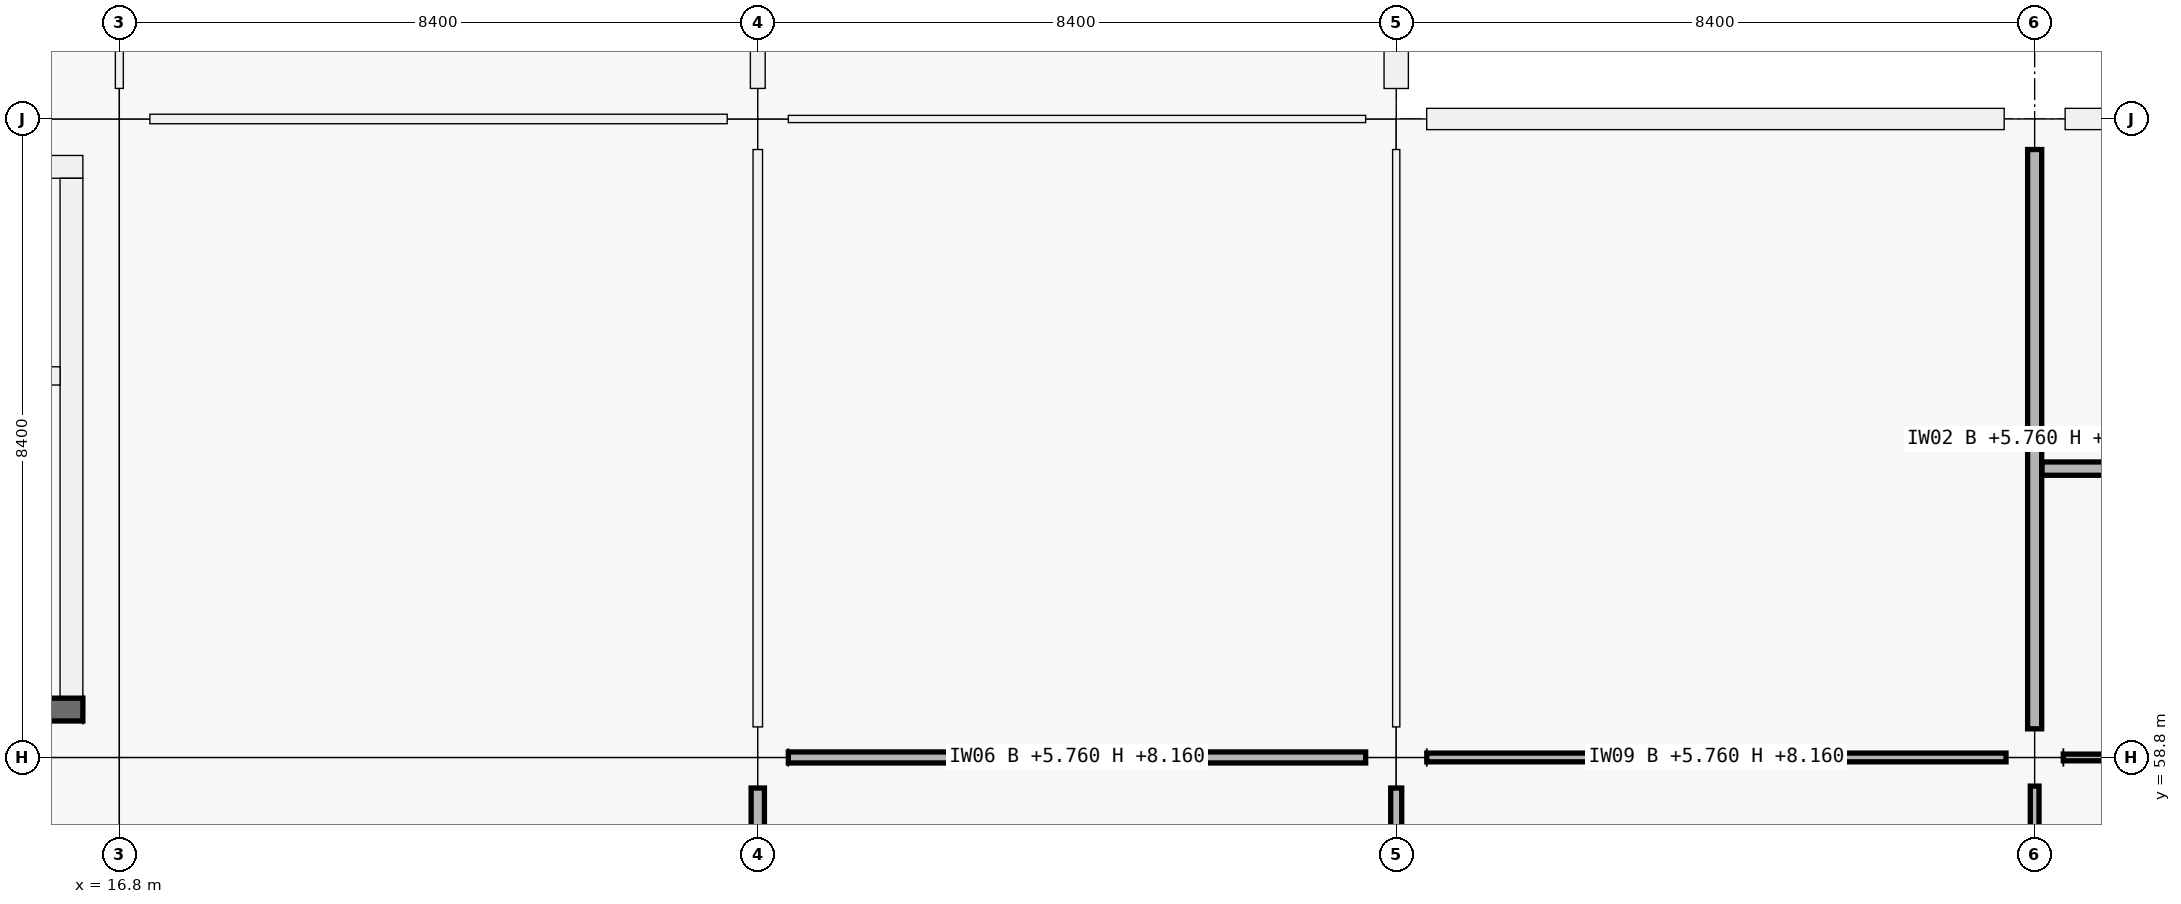
"""IFC4 building model, lengths in metres.
Left out: names, types, materials, properties, quantities, classifications, styles, units other than length and angle.
Written with IfcOpenShell. Run it as: python <this file> out.ifc"""

import sys

from ifc_helpers import new_model, si_unit, direction, frame, frame_2d, origin, origin_2d, place, context, subcontext, project, spatial, rectangle, extrude, element, fill, save


model = new_model("IFC4")
c1 = context("Model", 3, precision=1e-05, world=origin(), true_north=direction((0.0, 1.0)))
c2 = subcontext(c1, "Body", "Model", "MODEL_VIEW")
j1 = project(units=[si_unit("LENGTHUNIT", "METRE"), si_unit("PLANEANGLEUNIT", "RADIAN")], contexts=[c1])
p1 = place(None, origin())
s1 = spatial("IfcSite", under=j1, at=p1, CompositionType="ELEMENT")
p2 = place(p1, origin())
s2 = spatial("IfcBuilding", under=s1, at=p2, CompositionType="ELEMENT")
p3 = place(p2, frame((0.0, 0.0, 5.76)))
s3 = spatial("IfcBuildingStorey", under=s2, at=p3, CompositionType="ELEMENT", Elevation=5.76)
for number, where, z_axis, x_axis in (
    (1, (16.8, 58.8, 0.0), (0.0, 0.0, 1.0), (1.0, 0.0, 0.0)),
    (2, (16.8, 67.2, 0.0), (0.0, 0.0, 1.0), (1.0, 0.0, 0.0)),
    (3, (25.2, 58.8, 0.0), (0.0, 0.0, 1.0), (1.0, 0.0, 0.0)),
    (4, (25.2, 67.2, 0.0), (0.0, 0.0, 1.0), (1.0, 0.0, 0.0)),
    (5, (33.6, 58.8, 0.0), (0.0, 0.0, 1.0), (1.0, 0.0, 0.0)),
    (6, (33.6, 67.2, 0.0), (0.0, 0.0, 1.0), (1.0, 0.0, 0.0)),
):
    element("IfcColumn", number, at=place(p3, frame(where, z_axis=z_axis, x_axis=x_axis)), inside=s3, PredefinedType="COLUMN", context=c2, shape_type="SweptSolid", body=[
        extrude(rectangle(XDim=0.8, YDim=0.8, at=origin_2d()), origin(), (0.0, 0.0, 1.0), 4.5),
    ])
p4 = place(p3, frame((42.0, 58.8, 0.0), z_axis=(0.0, 0.0, 1.0), x_axis=(1.0, 0.0, 0.0)))
e7 = element("IfcColumn", 7, at=p4, inside=s3, PredefinedType="COLUMN", context=c2, shape_type="SweptSolid", body=[
    extrude(rectangle(XDim=0.75, YDim=0.75, at=origin_2d()), origin(), (0.0, 0.0, 1.0), 4.5),
])
p5 = place(p3, frame((42.0, 67.2, 0.0), z_axis=(0.0, 0.0, 1.0), x_axis=(1.0, 0.0, 0.0)))
e8 = element("IfcColumn", 8, at=p5, inside=s3, PredefinedType="COLUMN", context=c2, shape_type="SweptSolid", body=[
    extrude(rectangle(XDim=0.8, YDim=0.8, at=origin_2d()), origin(), (0.0, 0.0, 1.0), 4.5),
])
p6 = place(p3, frame((33.6, 75.199, 0.0), z_axis=(0.0, 0.0, 1.0), x_axis=(0.0, -1.0, 0.0)))
e9 = element("IfcWall", 9, at=p6, inside=s3, PredefinedType="SOLIDWALL", context=c2, shape_type="SweptSolid", body=[
    extrude(rectangle(XDim=7.598, YDim=0.32, at=frame_2d((3.799, 0.0))), origin(), (0.0, 0.0, 1.0), 3.4),
])
p7 = place(p6, frame((2.524, 0.0, 0.9)))
e10 = element("IfcOpeningElement", 10, at=p7, cuts=e9, PredefinedType="OPENING", context=c2, shape_type="SweptSolid", body=[
    extrude(rectangle(XDim=2.55, YDim=1.95, at=frame_2d((1.275, 0.975))), frame((0.0, 0.16, 0.0), z_axis=(0.0, -1.0, 0.0), x_axis=(1.0, 0.0, 0.0)), (0.0, 0.0, 1.0), 0.32),
])
p8 = place(p3, frame((34.001, 67.2, 0.0), z_axis=(0.0, 0.0, 1.0), x_axis=(1.0, 0.0, 0.0)))
e11 = element("IfcWall", 11, at=p8, inside=s3, PredefinedType="SOLIDWALL", context=c2, shape_type="SweptSolid", body=[
    extrude(rectangle(XDim=7.598, YDim=0.28, at=frame_2d((3.799, 0.0))), origin(), (0.0, 0.0, 1.0), 3.4),
])
p9 = place(p8, frame((3.149, 0.0, 0.9)))
e12 = element("IfcOpeningElement", 12, at=p9, cuts=e11, PredefinedType="OPENING", context=c2, shape_type="SweptSolid", body=[
    extrude(rectangle(XDim=1.3, YDim=1.95, at=frame_2d((0.65, 0.975))), frame((0.0, 0.14, 0.0), z_axis=(0.0, -1.0, 0.0), x_axis=(1.0, 0.0, 0.0)), (0.0, 0.0, 1.0), 0.28),
])
p10 = place(p3, frame((42.401, 67.2, 0.0), z_axis=(0.0, 0.0, 1.0), x_axis=(1.0, 0.0, 0.0)))
e13 = element("IfcWall", 13, at=p10, inside=s3, PredefinedType="SOLIDWALL", context=c2, shape_type="SweptSolid", body=[
    extrude(rectangle(XDim=7.598, YDim=0.28, at=frame_2d((3.799, 0.0))), origin(), (0.0, 0.0, 1.0), 3.4),
])
p11 = place(p10, frame((3.024, 0.0, 0.9)))
e14 = element("IfcOpeningElement", 14, at=p11, cuts=e13, PredefinedType="OPENING", context=c2, shape_type="SweptSolid", body=[
    extrude(rectangle(XDim=1.55, YDim=1.6, at=frame_2d((0.775, 0.8))), frame((0.0, 0.14, 0.0), z_axis=(0.0, -1.0, 0.0), x_axis=(1.0, 0.0, 0.0)), (0.0, 0.0, 1.0), 0.28),
])
p12 = place(p3, frame((16.32, 59.43, 0.0), z_axis=(0.0, 0.0, 1.0), x_axis=(-1.0, 0.0, 0.0)))
e15 = element("IfcWall", 15, at=p12, inside=s3, PredefinedType="SHEAR", context=c2, shape_type="SweptSolid", body=[
    extrude(rectangle(XDim=7.44, YDim=0.3, at=frame_2d((3.72, 0.0))), origin(), (0.0, 0.0, 1.0), 4.5),
])
p13 = place(p12, frame((1.28, 0.0, 0.0)))
e16 = element("IfcOpeningElement", 16, at=p13, cuts=e15, PredefinedType="OPENING", context=c2, shape_type="SweptSolid", body=[
    extrude(rectangle(XDim=1.5, YDim=2.15, at=frame_2d((0.75, 1.075))), frame((0.0, 0.15, 0.0), z_axis=(0.0, -1.0, 0.0), x_axis=(1.0, 0.0, 0.0)), (0.0, 0.0, 1.0), 0.3),
])
p14 = place(p3, frame((8.88, 66.57, 0.0), z_axis=(0.0, 0.0, 1.0), x_axis=(1.0, 0.0, 0.0)))
e17 = element("IfcWall", 17, at=p14, inside=s3, PredefinedType="SHEAR", context=c2, shape_type="SweptSolid", body=[
    extrude(rectangle(XDim=7.44, YDim=0.3, at=frame_2d((3.72, 0.0))), origin(), (0.0, 0.0, 1.0), 4.5),
])
p15 = place(p3, frame((16.17, 66.42, 0.0), z_axis=(0.0, 0.0, 1.0), x_axis=(0.0, -1.0, 0.0)))
e18 = element("IfcWall", 18, at=p15, inside=s3, PredefinedType="SHEAR", context=c2, shape_type="SweptSolid", body=[
    extrude(rectangle(XDim=6.84, YDim=0.3, at=frame_2d((3.42, 0.0))), origin(), (0.0, 0.0, 1.0), 4.5),
])
p16 = place(p3, frame((12.56, 63.82, 0.0), z_axis=(0.0, 0.0, 1.0), x_axis=(1.0, 0.0, 0.0)))
e19 = element("IfcWall", 19, at=p16, inside=s3, PredefinedType="SHEAR", context=c2, shape_type="SweptSolid", body=[
    extrude(rectangle(XDim=3.46, YDim=0.24, at=frame_2d((1.73, 0.0))), origin(), (0.0, 0.0, 1.0), 4.5),
])
p17 = place(p16, frame((1.18, 0.0, 0.0)))
e20 = element("IfcOpeningElement", 20, at=p17, cuts=e19, PredefinedType="OPENING", context=c2, shape_type="SweptSolid", body=[
    extrude(rectangle(XDim=1.1, YDim=2.15, at=frame_2d((0.55, 1.075))), frame((0.0, 0.12, 0.0), z_axis=(0.0, -1.0, 0.0), x_axis=(1.0, 0.0, 0.0)), (0.0, 0.0, 1.0), 0.24),
])
p18 = place(p3, frame((17.202, 67.2, 0.0), z_axis=(0.0, 0.0, 1.0), x_axis=(1.0, 0.0, 0.0)))
e21 = element("IfcWall", 21, at=p18, inside=s3, PredefinedType="PARTITIONING", context=c2, shape_type="SweptSolid", body=[
    extrude(rectangle(XDim=7.596, YDim=0.125, at=frame_2d((3.798, 0.0))), origin(), (0.0, 0.0, 1.0), 2.4),
])
p19 = place(p18, frame((3.273, 0.0, 0.0)))
e22 = element("IfcOpeningElement", 22, at=p19, cuts=e21, PredefinedType="OPENING", context=c2, shape_type="SweptSolid", body=[
    extrude(rectangle(XDim=1.05, YDim=2.12, at=frame_2d((0.525, 1.06))), frame((0.0, 0.062, 0.0), z_axis=(0.0, -1.0, 0.0), x_axis=(1.0, 0.0, 0.0)), (0.0, 0.0, 1.0), 0.125),
])
p20 = place(p3, frame((25.602, 58.8, 0.0), z_axis=(0.0, 0.0, 1.0), x_axis=(1.0, 0.0, 0.0)))
e23 = element("IfcWall", 23, at=p20, inside=s3, PredefinedType="PARTITIONING", context=c2, shape_type="SweptSolid", body=[
    extrude(rectangle(XDim=7.596, YDim=0.145, at=frame_2d((3.798, 0.0))), origin(), (0.0, 0.0, 1.0), 2.4),
])
p21 = place(p20, frame((3.268, 0.0, 0.0)))
e24 = element("IfcOpeningElement", 24, at=p21, cuts=e23, PredefinedType="OPENING", context=c2, shape_type="SweptSolid", body=[
    extrude(rectangle(XDim=1.06, YDim=2.22, at=frame_2d((0.53, 1.11))), frame((0.0, 0.073, 0.0), z_axis=(0.0, -1.0, 0.0), x_axis=(1.0, 0.0, 0.0)), (0.0, 0.0, 1.0), 0.145),
])
p22 = place(p3, frame((25.602, 67.2, 0.0), z_axis=(0.0, 0.0, 1.0), x_axis=(1.0, 0.0, 0.0)))
e25 = element("IfcWall", 25, at=p22, inside=s3, PredefinedType="PARTITIONING", context=c2, shape_type="SweptSolid", body=[
    extrude(rectangle(XDim=7.596, YDim=0.095, at=frame_2d((3.798, 0.0))), origin(), (0.0, 0.0, 1.0), 2.4),
])
p23 = place(p22, frame((3.258, 0.0, 0.0)))
e26 = element("IfcOpeningElement", 26, at=p23, cuts=e25, PredefinedType="OPENING", context=c2, shape_type="SweptSolid", body=[
    extrude(rectangle(XDim=1.08, YDim=2.22, at=frame_2d((0.54, 1.11))), frame((0.0, 0.047, 0.0), z_axis=(0.0, -1.0, 0.0), x_axis=(1.0, 0.0, 0.0)), (0.0, 0.0, 1.0), 0.095),
])
p24 = place(p3, frame((34.002, 58.8, 0.0), z_axis=(0.0, 0.0, 1.0), x_axis=(1.0, 0.0, 0.0)))
e27 = element("IfcWall", 27, at=p24, inside=s3, PredefinedType="PARTITIONING", context=c2, shape_type="SweptSolid", body=[
    extrude(rectangle(XDim=7.621, YDim=0.115, at=frame_2d((3.811, 0.0))), origin(), (0.0, 0.0, 1.0), 2.4),
])
p25 = place(p24, frame((3.28, 0.0, 0.0)))
e28 = element("IfcOpeningElement", 28, at=p25, cuts=e27, PredefinedType="OPENING", context=c2, shape_type="SweptSolid", body=[
    extrude(rectangle(XDim=1.06, YDim=2.22, at=frame_2d((0.53, 1.11))), frame((0.0, 0.058, 0.0), z_axis=(0.0, -1.0, 0.0), x_axis=(1.0, 0.0, 0.0)), (0.0, 0.0, 1.0), 0.115),
])
p26 = place(p3, frame((42.377, 58.8, 0.0), z_axis=(0.0, 0.0, 1.0), x_axis=(1.0, 0.0, 0.0)))
e29 = element("IfcWall", 29, at=p26, inside=s3, PredefinedType="PARTITIONING", context=c2, shape_type="SweptSolid", body=[
    extrude(rectangle(XDim=7.671, YDim=0.088, at=frame_2d((3.835, 0.0))), origin(), (0.0, 0.0, 1.0), 2.4),
])
p27 = place(p3, frame((16.8, 67.602, 0.0), z_axis=(0.0, 0.0, 1.0), x_axis=(0.0, 1.0, 0.0)))
e30 = element("IfcWall", 30, at=p27, inside=s3, PredefinedType="PARTITIONING", context=c2, shape_type="SweptSolid", body=[
    extrude(rectangle(XDim=7.596, YDim=0.105, at=frame_2d((3.798, 0.0))), origin(), (0.0, 0.0, 1.0), 2.4),
])
p28 = place(p27, frame((3.313, 0.0, 0.0)))
e31 = element("IfcOpeningElement", 31, at=p28, cuts=e30, PredefinedType="OPENING", context=c2, shape_type="SweptSolid", body=[
    extrude(rectangle(XDim=0.97, YDim=2.12, at=frame_2d((0.485, 1.06))), frame((0.0, 0.052, 0.0), z_axis=(0.0, -1.0, 0.0), x_axis=(1.0, 0.0, 0.0)), (0.0, 0.0, 1.0), 0.105),
])
p29 = place(p3, frame((25.2, 50.802, 0.0), z_axis=(0.0, 0.0, 1.0), x_axis=(0.0, 1.0, 0.0)))
e32 = element("IfcWall", 32, at=p29, inside=s3, PredefinedType="PARTITIONING", context=c2, shape_type="SweptSolid", body=[
    extrude(rectangle(XDim=7.596, YDim=0.175, at=frame_2d((3.798, 0.0))), origin(), (0.0, 0.0, 1.0), 2.4),
])
p30 = place(p29, frame((3.288, 0.0, 0.0)))
e33 = element("IfcOpeningElement", 33, at=p30, cuts=e32, PredefinedType="OPENING", context=c2, shape_type="SweptSolid", body=[
    extrude(rectangle(XDim=1.02, YDim=2.2, at=frame_2d((0.51, 1.1))), frame((0.0, 0.087, 0.0), z_axis=(0.0, -1.0, 0.0), x_axis=(1.0, 0.0, 0.0)), (0.0, 0.0, 1.0), 0.175),
])
p31 = place(p3, frame((25.2, 59.202, 0.0), z_axis=(0.0, 0.0, 1.0), x_axis=(0.0, 1.0, 0.0)))
e34 = element("IfcWall", 34, at=p31, inside=s3, PredefinedType="PARTITIONING", context=c2, shape_type="SweptSolid", body=[
    extrude(rectangle(XDim=7.596, YDim=0.125, at=frame_2d((3.798, 0.0))), origin(), (0.0, 0.0, 1.0), 2.4),
])
p32 = place(p31, frame((3.298, 0.0, 0.0)))
e35 = element("IfcOpeningElement", 35, at=p32, cuts=e34, PredefinedType="OPENING", context=c2, shape_type="SweptSolid", body=[
    extrude(rectangle(XDim=1.0, YDim=2.2, at=frame_2d((0.5, 1.1))), frame((0.0, 0.062, 0.0), z_axis=(0.0, -1.0, 0.0), x_axis=(1.0, 0.0, 0.0)), (0.0, 0.0, 1.0), 0.125),
])
p33 = place(p3, frame((25.2, 67.602, 0.0), z_axis=(0.0, 0.0, 1.0), x_axis=(0.0, 1.0, 0.0)))
e36 = element("IfcWall", 36, at=p33, inside=s3, PredefinedType="PARTITIONING", context=c2, shape_type="SweptSolid", body=[
    extrude(rectangle(XDim=7.596, YDim=0.195, at=frame_2d((3.798, 0.0))), origin(), (0.0, 0.0, 1.0), 2.4),
])
p34 = place(p33, frame((3.288, 0.0, 0.0)))
e37 = element("IfcOpeningElement", 37, at=p34, cuts=e36, PredefinedType="OPENING", context=c2, shape_type="SweptSolid", body=[
    extrude(rectangle(XDim=1.02, YDim=2.2, at=frame_2d((0.51, 1.1))), frame((0.0, 0.098, 0.0), z_axis=(0.0, -1.0, 0.0), x_axis=(1.0, 0.0, 0.0)), (0.0, 0.0, 1.0), 0.195),
])
p35 = place(p3, frame((33.6, 50.802, 0.0), z_axis=(0.0, 0.0, 1.0), x_axis=(0.0, 1.0, 0.0)))
e38 = element("IfcWall", 38, at=p35, inside=s3, PredefinedType="PARTITIONING", context=c2, shape_type="SweptSolid", body=[
    extrude(rectangle(XDim=7.596, YDim=0.145, at=frame_2d((3.798, 0.0))), origin(), (0.0, 0.0, 1.0), 2.4),
])
p36 = place(p35, frame((3.318, 0.0, 0.0)))
e39 = element("IfcOpeningElement", 39, at=p36, cuts=e38, PredefinedType="OPENING", context=c2, shape_type="SweptSolid", body=[
    extrude(rectangle(XDim=0.96, YDim=2.18, at=frame_2d((0.48, 1.09))), frame((0.0, 0.073, 0.0), z_axis=(0.0, -1.0, 0.0), x_axis=(1.0, 0.0, 0.0)), (0.0, 0.0, 1.0), 0.145),
])
p37 = place(p3, frame((33.6, 59.202, 0.0), z_axis=(0.0, 0.0, 1.0), x_axis=(0.0, 1.0, 0.0)))
e40 = element("IfcWall", 40, at=p37, inside=s3, PredefinedType="PARTITIONING", context=c2, shape_type="SweptSolid", body=[
    extrude(rectangle(XDim=7.596, YDim=0.095, at=frame_2d((3.798, 0.0))), origin(), (0.0, 0.0, 1.0), 2.4),
])
p38 = place(p37, frame((3.308, 0.0, 0.0)))
e41 = element("IfcOpeningElement", 41, at=p38, cuts=e40, PredefinedType="OPENING", context=c2, shape_type="SweptSolid", body=[
    extrude(rectangle(XDim=0.98, YDim=2.18, at=frame_2d((0.49, 1.09))), frame((0.0, 0.047, 0.0), z_axis=(0.0, -1.0, 0.0), x_axis=(1.0, 0.0, 0.0)), (0.0, 0.0, 1.0), 0.095),
])
p39 = place(p3, frame((42.0, 50.752, 0.0), z_axis=(0.0, 0.0, 1.0), x_axis=(0.0, 1.0, 0.0)))
e42 = element("IfcWall", 42, at=p39, inside=s3, PredefinedType="PARTITIONING", context=c2, shape_type="SweptSolid", body=[
    extrude(rectangle(XDim=7.671, YDim=0.115, at=frame_2d((3.835, 0.0))), origin(), (0.0, 0.0, 1.0), 2.4),
])
p40 = place(p3, frame((42.0, 59.177, 0.0), z_axis=(0.0, 0.0, 1.0), x_axis=(0.0, 1.0, 0.0)))
e43 = element("IfcWall", 43, at=p40, inside=s3, PredefinedType="PARTITIONING", context=c2, shape_type="SweptSolid", body=[
    extrude(rectangle(XDim=7.621, YDim=0.185, at=frame_2d((3.811, 0.0))), origin(), (0.0, 0.0, 1.0), 2.4),
])
p41 = place(p3, frame((42.094, 62.6, 0.0), z_axis=(0.0, 0.0, 1.0), x_axis=(1.0, 0.0, 0.0)))
e44 = element("IfcWall", 44, at=p41, inside=s3, PredefinedType="PARTITIONING", context=c2, shape_type="SweptSolid", body=[
    extrude(rectangle(XDim=8.226, YDim=0.175, at=frame_2d((4.113, 0.0))), origin(), (0.0, 0.0, 1.0), 2.4),
])
p42 = place(p9, origin())
e45 = element("IfcWindow", 45, at=p42, inside=s3, PartitioningType="SINGLE_PANEL", PredefinedType="WINDOW", context=c2, shape_type="SweptSolid", body=[
    extrude(rectangle(XDim=1.3, YDim=1.95, at=frame_2d((0.65, 0.975))), frame((0.0, 0.03, 0.0), z_axis=(0.0, -1.0, 0.0), x_axis=(1.0, 0.0, 0.0)), (0.0, 0.0, 1.0), 0.06),
])
fill(e12, e45)
p43 = place(p19, origin())
e46 = element("IfcDoor", 46, at=p43, inside=s3, OperationType="SINGLE_SWING_LEFT", PredefinedType="DOOR", context=c2, shape_type="SweptSolid", body=[
    extrude(rectangle(XDim=1.05, YDim=2.12, at=frame_2d((0.525, 1.06))), frame((0.0, 0.025, 0.0), z_axis=(0.0, -1.0, 0.0), x_axis=(1.0, 0.0, 0.0)), (0.0, 0.0, 1.0), 0.05),
])
fill(e22, e46)
p44 = place(p32, origin())
e47 = element("IfcDoor", 47, at=p44, inside=s3, OperationType="SINGLE_SWING_RIGHT", PredefinedType="DOOR", context=c2, shape_type="SweptSolid", body=[
    extrude(rectangle(XDim=1.0, YDim=2.2, at=frame_2d((0.5, 1.1))), frame((0.0, 0.025, 0.0), z_axis=(0.0, -1.0, 0.0), x_axis=(1.0, 0.0, 0.0)), (0.0, 0.0, 1.0), 0.05),
])
fill(e35, e47)
p45 = place(p23, origin())
e48 = element("IfcDoor", 48, at=p45, inside=s3, OperationType="SINGLE_SWING_RIGHT", PredefinedType="DOOR", context=c2, shape_type="SweptSolid", body=[
    extrude(rectangle(XDim=1.08, YDim=2.22, at=frame_2d((0.54, 1.11))), frame((0.0, 0.025, 0.0), z_axis=(0.0, -1.0, 0.0), x_axis=(1.0, 0.0, 0.0)), (0.0, 0.0, 1.0), 0.05),
])
fill(e26, e48)
p46 = place(p25, origin())
e49 = element("IfcDoor", 49, at=p46, inside=s3, OperationType="SINGLE_SWING_LEFT", PredefinedType="DOOR", context=c2, shape_type="SweptSolid", body=[
    extrude(rectangle(XDim=1.06, YDim=2.22, at=frame_2d((0.53, 1.11))), frame((0.0, 0.025, 0.0), z_axis=(0.0, -1.0, 0.0), x_axis=(1.0, 0.0, 0.0)), (0.0, 0.0, 1.0), 0.05),
])
fill(e28, e49)
p47 = place(p21, origin())
e50 = element("IfcDoor", 50, at=p47, inside=s3, OperationType="SINGLE_SWING_RIGHT", PredefinedType="DOOR", context=c2, shape_type="SweptSolid", body=[
    extrude(rectangle(XDim=1.06, YDim=2.22, at=frame_2d((0.53, 1.11))), frame((0.0, 0.025, 0.0), z_axis=(0.0, -1.0, 0.0), x_axis=(1.0, 0.0, 0.0)), (0.0, 0.0, 1.0), 0.05),
])
fill(e24, e50)
p48 = place(p38, origin())
e51 = element("IfcDoor", 51, at=p48, inside=s3, OperationType="SINGLE_SWING_LEFT", PredefinedType="DOOR", context=c2, shape_type="SweptSolid", body=[
    extrude(rectangle(XDim=0.98, YDim=2.18, at=frame_2d((0.49, 1.09))), frame((0.0, 0.025, 0.0), z_axis=(0.0, -1.0, 0.0), x_axis=(1.0, 0.0, 0.0)), (0.0, 0.0, 1.0), 0.05),
])
fill(e41, e51)
save(model, sys.argv[1])
